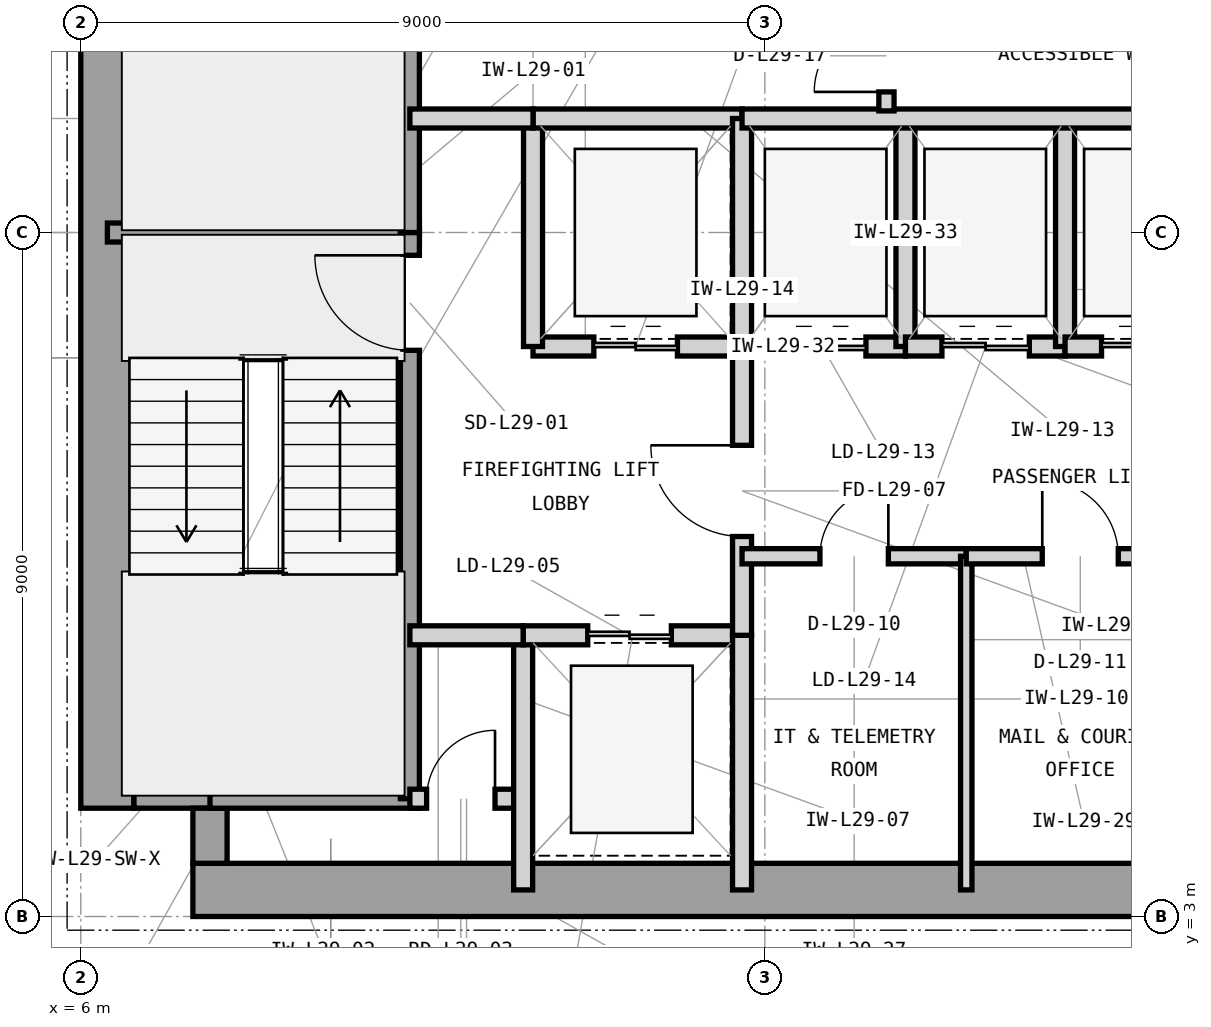
"""IFC4 building model, lengths in metres.
Left out: names, types, materials, properties, quantities, classifications, styles, units other than length and angle.
Written with IfcOpenShell. Run it as: python <this file> out.ifc"""

import sys

from ifc_helpers import new_model, si_unit, direction, frame, frame_2d, origin, place, context, subcontext, project, spatial, rectangle, extrude, element, fill, save


model = new_model("IFC4")
c1 = context("Model", 3, precision=1e-05, world=origin(), true_north=direction((0.0, 1.0)))
c2 = subcontext(c1, "Body", "Model", "MODEL_VIEW")
j1 = project(units=[si_unit("LENGTHUNIT", "METRE"), si_unit("PLANEANGLEUNIT", "RADIAN")], contexts=[c1])
p1 = place(None, origin())
s1 = spatial("IfcSite", under=j1, at=p1, CompositionType="ELEMENT")
p2 = place(p1, origin())
s2 = spatial("IfcBuilding", under=s1, at=p2, CompositionType="ELEMENT")
p3 = place(p2, frame((0.0, 0.0, 124.5)))
s3 = spatial("IfcBuildingStorey", under=s2, at=p3, CompositionType="ELEMENT", Elevation=124.5)
p4 = place(p3, frame((7.475, 3.35, 0.0), z_axis=(0.0, 0.0, 1.0), x_axis=(1.0, 0.0, 0.0)))
e1 = element("IfcWall", 1, at=p4, inside=s3, PredefinedType="SHEAR", context=c2, shape_type="SweptSolid", body=[
    extrude(rectangle(XDim=16.525, YDim=0.7, at=frame_2d((8.262, 0.0))), origin(), (0.0, 0.0, 1.0), 3.9),
])
p5 = place(p3, frame((6.35, 4.425, 0.0), z_axis=(0.0, 0.0, 1.0), x_axis=(0.0, 1.0, 0.0)))
e2 = element("IfcWall", 2, at=p5, inside=s3, PredefinedType="SHEAR", context=c2, shape_type="SweptSolid", body=[
    extrude(rectangle(XDim=15.15, YDim=0.7, at=frame_2d((7.575, 0.0))), origin(), (0.0, 0.0, 1.0), 3.9),
])
p6 = place(p3, frame((6.7, 4.65, 0.0), z_axis=(0.0, 0.0, 1.0), x_axis=(1.0, 0.0, 0.0)))
e3 = element("IfcWall", 3, at=p6, inside=s3, PredefinedType="SHEAR", context=c2, shape_type="SweptSolid", body=[
    extrude(rectangle(XDim=1.225, YDim=0.45, at=frame_2d((0.613, 0.0))), origin(), (0.0, 0.0, 1.0), 3.9),
])
p7 = place(p3, frame((7.7, 3.7, 0.0), z_axis=(0.0, 0.0, 1.0), x_axis=(0.0, 1.0, 0.0)))
e4 = element("IfcWall", 4, at=p7, inside=s3, PredefinedType="SHEAR", context=c2, shape_type="SweptSolid", body=[
    extrude(rectangle(XDim=0.725, YDim=0.45, at=frame_2d((0.363, 0.0))), origin(), (0.0, 0.0, 1.0), 3.9),
])
p8 = place(p3, frame((6.35, 12.0, 0.0), z_axis=(0.0, 0.0, 1.0), x_axis=(1.0, 0.0, 0.0)))
e5 = element("IfcWall", 5, at=p8, inside=s3, PredefinedType="SHEAR", context=c2, shape_type="SweptSolid", body=[
    extrude(rectangle(XDim=4.105, YDim=0.25, at=frame_2d((2.052, 0.0))), origin(), (0.0, 0.0, 1.0), 3.9),
])
p9 = place(p3, frame((7.7, 4.55, 0.0), z_axis=(0.0, 0.0, 1.0), x_axis=(1.0, 0.0, 0.0)))
e6 = element("IfcWall", 6, at=p9, inside=s3, PredefinedType="SHEAR", context=c2, shape_type="SweptSolid", body=[
    extrude(rectangle(XDim=2.755, YDim=0.25, at=frame_2d((1.377, 0.0))), origin(), (0.0, 0.0, 1.0), 3.9),
])
p10 = place(p3, frame((10.33, 4.55, 0.0), z_axis=(0.0, 0.0, 1.0), x_axis=(0.0, 1.0, 0.0)))
e7 = element("IfcWall", 7, at=p10, inside=s3, PredefinedType="SHEAR", context=c2, shape_type="SweptSolid", body=[
    extrude(rectangle(XDim=7.45, YDim=0.25, at=frame_2d((3.725, 0.0))), origin(), (0.0, 0.0, 1.0), 3.9),
])
p11 = place(p10, frame((5.9, 0.0, 0.0)))
e8 = element("IfcOpeningElement", 8, at=p11, cuts=e7, PredefinedType="OPENING", context=c2, shape_type="SweptSolid", body=[
    extrude(rectangle(XDim=1.25, YDim=2.2, at=frame_2d((0.625, 1.1))), frame((0.0, 0.135, 0.0), z_axis=(0.0, -1.0, 0.0), x_axis=(1.0, 0.0, 0.0)), (0.0, 0.0, 1.0), 0.27),
])
p12 = place(p3, frame((10.33, 12.0, 0.0), z_axis=(0.0, 0.0, 1.0), x_axis=(0.0, 1.0, 0.0)))
e9 = element("IfcWall", 9, at=p12, inside=s3, PredefinedType="SHEAR", context=c2, shape_type="SweptSolid", body=[
    extrude(rectangle(XDim=7.45, YDim=0.25, at=frame_2d((3.725, 0.0))), origin(), (0.0, 0.0, 1.0), 3.9),
])
p13 = place(p12, frame((5.85, 0.0, 0.0)))
e10 = element("IfcOpeningElement", 10, at=p13, cuts=e9, PredefinedType="OPENING", context=c2, shape_type="SweptSolid", body=[
    extrude(rectangle(XDim=1.25, YDim=2.2, at=frame_2d((0.625, 1.1))), frame((0.0, 0.135, 0.0), z_axis=(0.0, -1.0, 0.0), x_axis=(1.0, 0.0, 0.0)), (0.0, 0.0, 1.0), 0.27),
])
p14 = place(p3, frame((10.33, 4.55, 0.0), z_axis=(0.0, 0.0, 1.0), x_axis=(1.0, 0.0, 0.0)))
e11 = element("IfcWall", 11, at=p14, inside=s3, PredefinedType="PARTITIONING", context=c2, shape_type="SweptSolid", body=[
    extrude(rectangle(XDim=1.49, YDim=0.25, at=frame_2d((0.745, 0.0))), origin(), (0.0, 0.0, 1.0), 3.69),
])
p15 = place(p14, frame((0.22, 0.0, 0.0)))
e12 = element("IfcOpeningElement", 12, at=p15, cuts=e11, PredefinedType="OPENING", context=c2, shape_type="SweptSolid", body=[
    extrude(rectangle(XDim=0.9, YDim=2.1, at=frame_2d((0.45, 1.05))), frame((0.0, 0.135, 0.0), z_axis=(0.0, -1.0, 0.0), x_axis=(1.0, 0.0, 0.0)), (0.0, 0.0, 1.0), 0.27),
])
p16 = place(p3, frame((11.82, 3.35, 0.0), z_axis=(0.0, 0.0, 1.0), x_axis=(0.0, 1.0, 0.0)))
e13 = element("IfcWall", 13, at=p16, inside=s3, PredefinedType="PARTITIONING", context=c2, shape_type="SweptSolid", body=[
    extrude(rectangle(XDim=3.35, YDim=0.25, at=frame_2d((1.675, 0.0))), origin(), (0.0, 0.0, 1.0), 3.69),
])
p17 = place(p3, frame((11.82, 6.7, 0.0), z_axis=(0.0, 0.0, 1.0), x_axis=(1.0, 0.0, 0.0)))
e14 = element("IfcWall", 14, at=p17, inside=s3, PredefinedType="PARTITIONING", context=c2, shape_type="SweptSolid", body=[
    extrude(rectangle(XDim=2.88, YDim=0.25, at=frame_2d((1.44, 0.0))), origin(), (0.0, 0.0, 1.0), 3.233),
])
p18 = place(p17, frame((0.85, 0.0, 0.0)))
e15 = element("IfcOpeningElement", 15, at=p18, cuts=e14, PredefinedType="OPENING", context=c2, shape_type="SweptSolid", body=[
    extrude(rectangle(XDim=1.1, YDim=2.25, at=frame_2d((0.55, 1.125))), frame((0.0, 0.135, 0.0), z_axis=(0.0, -1.0, 0.0), x_axis=(1.0, 0.0, 0.0)), (0.0, 0.0, 1.0), 0.27),
])
p19 = place(p3, frame((14.7, 3.35, 0.0), z_axis=(0.0, 0.0, 1.0), x_axis=(0.0, 1.0, 0.0)))
e16 = element("IfcWall", 16, at=p19, inside=s3, PredefinedType="PARTITIONING", context=c2, shape_type="SweptSolid", body=[
    extrude(rectangle(XDim=3.35, YDim=0.25, at=frame_2d((1.675, 0.0))), origin(), (0.0, 0.0, 1.0), 3.69),
])
p20 = place(p3, frame((11.95, 10.5, 0.0), z_axis=(0.0, 0.0, 1.0), x_axis=(1.0, 0.0, 0.0)))
e17 = element("IfcWall", 17, at=p20, inside=s3, PredefinedType="PARTITIONING", context=c2, shape_type="SweptSolid", body=[
    extrude(rectangle(XDim=2.75, YDim=0.25, at=frame_2d((1.375, 0.0))), origin(), (0.0, 0.0, 1.0), 3.233),
])
p21 = place(p20, frame((0.8, 0.0, 0.0)))
e18 = element("IfcOpeningElement", 18, at=p21, cuts=e17, PredefinedType="OPENING", context=c2, shape_type="SweptSolid", body=[
    extrude(rectangle(XDim=1.1, YDim=2.25, at=frame_2d((0.55, 1.125))), frame((0.0, 0.135, 0.0), z_axis=(0.0, -1.0, 0.0), x_axis=(1.0, 0.0, 0.0)), (0.0, 0.0, 1.0), 0.27),
])
p22 = place(p3, frame((11.95, 10.5, 0.0), z_axis=(0.0, 0.0, 1.0), x_axis=(0.0, 1.0, 0.0)))
e19 = element("IfcWall", 19, at=p22, inside=s3, PredefinedType="PARTITIONING", context=c2, shape_type="SweptSolid", body=[
    extrude(rectangle(XDim=3.0, YDim=0.25, at=frame_2d((1.5, 0.0))), origin(), (0.0, 0.0, 1.0), 3.69),
])
p23 = place(p3, frame((11.95, 13.5, 0.0), z_axis=(0.0, 0.0, 1.0), x_axis=(1.0, 0.0, 0.0)))
e20 = element("IfcWall", 20, at=p23, inside=s3, PredefinedType="PARTITIONING", context=c2, shape_type="SweptSolid", body=[
    extrude(rectangle(XDim=2.75, YDim=0.25, at=frame_2d((1.375, 0.0))), origin(), (0.0, 0.0, 1.0), 3.233),
])
p24 = place(p3, frame((14.7, 10.5, 0.0), z_axis=(0.0, 0.0, 1.0), x_axis=(0.0, 1.0, 0.0)))
e21 = element("IfcWall", 21, at=p24, inside=s3, PredefinedType="PARTITIONING", context=c2, shape_type="SweptSolid", body=[
    extrude(rectangle(XDim=3.0, YDim=0.25, at=frame_2d((1.5, 0.0))), origin(), (0.0, 0.0, 1.0), 3.69),
])
p25 = place(p3, frame((14.7, 6.7, 0.0), z_axis=(0.0, 0.0, 1.0), x_axis=(0.0, 1.0, 0.0)))
e22 = element("IfcWall", 22, at=p25, inside=s3, PredefinedType="PARTITIONING", context=c2, shape_type="SweptSolid", body=[
    extrude(rectangle(XDim=3.8, YDim=0.25, at=frame_2d((1.9, 0.0))), origin(), (0.0, 0.0, 1.0), 3.69),
])
p26 = place(p25, frame((1.3, 0.0, 0.0)))
e23 = element("IfcOpeningElement", 23, at=p26, cuts=e22, PredefinedType="OPENING", context=c2, shape_type="SweptSolid", body=[
    extrude(rectangle(XDim=1.2, YDim=2.2, at=frame_2d((0.6, 1.1))), frame((0.0, 0.135, 0.0), z_axis=(0.0, -1.0, 0.0), x_axis=(1.0, 0.0, 0.0)), (0.0, 0.0, 1.0), 0.27),
])
p27 = place(p3, frame((10.33, 13.5, 0.0), z_axis=(0.0, 0.0, 1.0), x_axis=(1.0, 0.0, 0.0)))
e24 = element("IfcWall", 24, at=p27, inside=s3, PredefinedType="PARTITIONING", context=c2, shape_type="SweptSolid", body=[
    extrude(rectangle(XDim=1.62, YDim=0.25, at=frame_2d((0.81, 0.0))), origin(), (0.0, 0.0, 1.0), 3.233),
])
p28 = place(p3, frame((10.33, 6.7, 0.0), z_axis=(0.0, 0.0, 1.0), x_axis=(1.0, 0.0, 0.0)))
e25 = element("IfcWall", 25, at=p28, inside=s3, PredefinedType="PARTITIONING", context=c2, shape_type="SweptSolid", body=[
    extrude(rectangle(XDim=1.49, YDim=0.25, at=frame_2d((0.745, 0.0))), origin(), (0.0, 0.0, 1.0), 3.233),
])
p29 = place(p3, frame((14.7, 7.74, 0.0), z_axis=(0.0, 0.0, 1.0), x_axis=(1.0, 0.0, 0.0)))
e26 = element("IfcWall", 26, at=p29, inside=s3, PredefinedType="PARTITIONING", context=c2, shape_type="SweptSolid", body=[
    extrude(rectangle(XDim=2.95, YDim=0.2, at=frame_2d((1.475, 0.0))), origin(), (0.0, 0.0, 1.0), 3.69),
])
p30 = place(p29, frame((1.025, 0.0, 0.0)))
e27 = element("IfcOpeningElement", 27, at=p30, cuts=e26, PredefinedType="OPENING", context=c2, shape_type="SweptSolid", body=[
    extrude(rectangle(XDim=0.9, YDim=2.1, at=frame_2d((0.45, 1.05))), frame((0.0, 0.11, 0.0), z_axis=(0.0, -1.0, 0.0), x_axis=(1.0, 0.0, 0.0)), (0.0, 0.0, 1.0), 0.22),
])
p31 = place(p3, frame((17.65, 3.35, 0.0), z_axis=(0.0, 0.0, 1.0), x_axis=(0.0, 1.0, 0.0)))
e28 = element("IfcWall", 28, at=p31, inside=s3, PredefinedType="PARTITIONING", context=c2, shape_type="SweptSolid", body=[
    extrude(rectangle(XDim=4.39, YDim=0.15, at=frame_2d((2.195, 0.0))), origin(), (0.0, 0.0, 1.0), 3.69),
])
p32 = place(p3, frame((17.65, 7.74, 0.0), z_axis=(0.0, 0.0, 1.0), x_axis=(1.0, 0.0, 0.0)))
e29 = element("IfcWall", 29, at=p32, inside=s3, PredefinedType="PARTITIONING", context=c2, shape_type="SweptSolid", body=[
    extrude(rectangle(XDim=3.0, YDim=0.2, at=frame_2d((1.5, 0.0))), origin(), (0.0, 0.0, 1.0), 3.69),
])
p33 = place(p32, frame((1.0, 0.0, 0.0)))
e30 = element("IfcOpeningElement", 30, at=p33, cuts=e29, PredefinedType="OPENING", context=c2, shape_type="SweptSolid", body=[
    extrude(rectangle(XDim=1.0, YDim=2.15, at=frame_2d((0.5, 1.075))), frame((0.0, 0.11, 0.0), z_axis=(0.0, -1.0, 0.0), x_axis=(1.0, 0.0, 0.0)), (0.0, 0.0, 1.0), 0.22),
])
p34 = place(p3, frame((14.7, 10.5, 0.0), z_axis=(0.0, 0.0, 1.0), x_axis=(1.0, 0.0, 0.0)))
e31 = element("IfcWall", 31, at=p34, inside=s3, PredefinedType="PARTITIONING", context=c2, shape_type="SweptSolid", body=[
    extrude(rectangle(XDim=2.15, YDim=0.25, at=frame_2d((1.075, 0.0))), origin(), (0.0, 0.0, 1.0), 3.233),
])
p35 = place(p34, frame((0.48, 0.0, 0.0)))
e32 = element("IfcOpeningElement", 32, at=p35, cuts=e31, PredefinedType="OPENING", context=c2, shape_type="SweptSolid", body=[
    extrude(rectangle(XDim=1.15, YDim=2.25, at=frame_2d((0.575, 1.125))), frame((0.0, 0.135, 0.0), z_axis=(0.0, -1.0, 0.0), x_axis=(1.0, 0.0, 0.0)), (0.0, 0.0, 1.0), 0.27),
])
p36 = place(p3, frame((16.85, 10.5, 0.0), z_axis=(0.0, 0.0, 1.0), x_axis=(0.0, 1.0, 0.0)))
e33 = element("IfcWall", 33, at=p36, inside=s3, PredefinedType="PARTITIONING", context=c2, shape_type="SweptSolid", body=[
    extrude(rectangle(XDim=3.0, YDim=0.25, at=frame_2d((1.5, 0.0))), origin(), (0.0, 0.0, 1.0), 3.69),
])
p37 = place(p3, frame((16.85, 10.5, 0.0), z_axis=(0.0, 0.0, 1.0), x_axis=(1.0, 0.0, 0.0)))
e34 = element("IfcWall", 34, at=p37, inside=s3, PredefinedType="PARTITIONING", context=c2, shape_type="SweptSolid", body=[
    extrude(rectangle(XDim=2.1, YDim=0.25, at=frame_2d((1.05, 0.0))), origin(), (0.0, 0.0, 1.0), 3.233),
])
p38 = place(p37, frame((0.48, 0.0, 0.0)))
e35 = element("IfcOpeningElement", 35, at=p38, cuts=e34, PredefinedType="OPENING", context=c2, shape_type="SweptSolid", body=[
    extrude(rectangle(XDim=1.15, YDim=2.25, at=frame_2d((0.575, 1.125))), frame((0.0, 0.135, 0.0), z_axis=(0.0, -1.0, 0.0), x_axis=(1.0, 0.0, 0.0)), (0.0, 0.0, 1.0), 0.27),
])
p39 = place(p3, frame((18.95, 10.5, 0.0), z_axis=(0.0, 0.0, 1.0), x_axis=(0.0, 1.0, 0.0)))
e36 = element("IfcWall", 36, at=p39, inside=s3, PredefinedType="PARTITIONING", context=c2, shape_type="SweptSolid", body=[
    extrude(rectangle(XDim=3.0, YDim=0.25, at=frame_2d((1.5, 0.0))), origin(), (0.0, 0.0, 1.0), 3.69),
])
p40 = place(p3, frame((18.95, 10.5, 0.0), z_axis=(0.0, 0.0, 1.0), x_axis=(1.0, 0.0, 0.0)))
e37 = element("IfcWall", 37, at=p40, inside=s3, PredefinedType="PARTITIONING", context=c2, shape_type="SweptSolid", body=[
    extrude(rectangle(XDim=2.1, YDim=0.25, at=frame_2d((1.05, 0.0))), origin(), (0.0, 0.0, 1.0), 3.233),
])
p41 = place(p40, frame((0.48, 0.0, 0.0)))
e38 = element("IfcOpeningElement", 38, at=p41, cuts=e37, PredefinedType="OPENING", context=c2, shape_type="SweptSolid", body=[
    extrude(rectangle(XDim=1.15, YDim=2.25, at=frame_2d((0.575, 1.125))), frame((0.0, 0.135, 0.0), z_axis=(0.0, -1.0, 0.0), x_axis=(1.0, 0.0, 0.0)), (0.0, 0.0, 1.0), 0.27),
])
p42 = place(p3, frame((14.7, 13.5, 0.0), z_axis=(0.0, 0.0, 1.0), x_axis=(1.0, 0.0, 0.0)))
e39 = element("IfcWall", 39, at=p42, inside=s3, PredefinedType="PARTITIONING", context=c2, shape_type="SweptSolid", body=[
    extrude(rectangle(XDim=8.95, YDim=0.25, at=frame_2d((4.475, 0.0))), origin(), (0.0, 0.0, 1.0), 3.233),
])
p43 = place(p3, frame((16.6, 13.6, 0.0), z_axis=(0.0, 0.0, 1.0), x_axis=(0.0, 1.0, 0.0)))
e40 = element("IfcWall", 40, at=p43, inside=s3, PredefinedType="PARTITIONING", context=c2, shape_type="SweptSolid", body=[
    extrude(rectangle(XDim=3.0, YDim=0.2, at=frame_2d((1.5, 0.0))), origin(), (0.0, 0.0, 1.0), 3.69),
])
p44 = place(p43, frame((0.25, 0.0, 0.0)))
e41 = element("IfcOpeningElement", 41, at=p44, cuts=e40, PredefinedType="OPENING", context=c2, shape_type="SweptSolid", body=[
    extrude(rectangle(XDim=0.95, YDim=2.1, at=frame_2d((0.475, 1.05))), frame((0.0, 0.11, 0.0), z_axis=(0.0, -1.0, 0.0), x_axis=(1.0, 0.0, 0.0)), (0.0, 0.0, 1.0), 0.22),
])
p45 = place(p43, frame((1.8, 0.0, 0.0)))
e42 = element("IfcOpeningElement", 42, at=p45, cuts=e40, PredefinedType="OPENING", context=c2, shape_type="SweptSolid", body=[
    extrude(rectangle(XDim=0.95, YDim=2.1, at=frame_2d((0.475, 1.05))), frame((0.0, 0.11, 0.0), z_axis=(0.0, -1.0, 0.0), x_axis=(1.0, 0.0, 0.0)), (0.0, 0.0, 1.0), 0.22),
])
p46 = place(p11, origin())
e43 = element("IfcDoor", 43, at=p46, inside=s3, OperationType="SINGLE_SWING_RIGHT", PredefinedType="DOOR", context=c2, shape_type="SweptSolid", body=[
    extrude(rectangle(XDim=1.25, YDim=2.2, at=frame_2d((0.625, 1.1))), frame((0.0, 0.025, 0.0), z_axis=(0.0, -1.0, 0.0), x_axis=(1.0, 0.0, 0.0)), (0.0, 0.0, 1.0), 0.05),
])
fill(e8, e43)
p47 = place(p15, origin())
e44 = element("IfcDoor", 44, at=p47, inside=s3, OperationType="SINGLE_SWING_RIGHT", PredefinedType="TRAPDOOR", context=c2, shape_type="SweptSolid", body=[
    extrude(rectangle(XDim=0.9, YDim=2.1, at=frame_2d((0.45, 1.05))), frame((0.0, 0.025, 0.0), z_axis=(0.0, -1.0, 0.0), x_axis=(1.0, 0.0, 0.0)), (0.0, 0.0, 1.0), 0.05),
])
fill(e12, e44)
p48 = place(p18, origin())
e45 = element("IfcDoor", 45, at=p48, inside=s3, OperationType="DOUBLE_DOOR_SLIDING", PredefinedType="DOOR", context=c2, shape_type="SweptSolid", body=[
    extrude(rectangle(XDim=1.1, YDim=2.25, at=frame_2d((0.55, 1.125))), frame((0.0, 0.025, 0.0), z_axis=(0.0, -1.0, 0.0), x_axis=(1.0, 0.0, 0.0)), (0.0, 0.0, 1.0), 0.05),
])
fill(e15, e45)
p49 = place(p21, origin())
e46 = element("IfcDoor", 46, at=p49, inside=s3, OperationType="DOUBLE_DOOR_SLIDING", PredefinedType="DOOR", context=c2, shape_type="SweptSolid", body=[
    extrude(rectangle(XDim=1.1, YDim=2.25, at=frame_2d((0.55, 1.125))), frame((0.0, 0.025, 0.0), z_axis=(0.0, -1.0, 0.0), x_axis=(1.0, 0.0, 0.0)), (0.0, 0.0, 1.0), 0.05),
])
fill(e18, e46)
p50 = place(p26, origin())
e47 = element("IfcDoor", 47, at=p50, inside=s3, OperationType="SINGLE_SWING_RIGHT", PredefinedType="DOOR", context=c2, shape_type="SweptSolid", body=[
    extrude(rectangle(XDim=1.2, YDim=2.2, at=frame_2d((0.6, 1.1))), frame((0.0, 0.025, 0.0), z_axis=(0.0, -1.0, 0.0), x_axis=(1.0, 0.0, 0.0)), (0.0, 0.0, 1.0), 0.05),
])
fill(e23, e47)
p51 = place(p30, origin())
e48 = element("IfcDoor", 48, at=p51, inside=s3, OperationType="SINGLE_SWING_RIGHT", PredefinedType="TRAPDOOR", context=c2, shape_type="SweptSolid", body=[
    extrude(rectangle(XDim=0.9, YDim=2.1, at=frame_2d((0.45, 1.05))), frame((0.0, 0.025, 0.0), z_axis=(0.0, -1.0, 0.0), x_axis=(1.0, 0.0, 0.0)), (0.0, 0.0, 1.0), 0.05),
])
fill(e27, e48)
p52 = place(p33, origin())
e49 = element("IfcDoor", 49, at=p52, inside=s3, OperationType="SINGLE_SWING_LEFT", PredefinedType="DOOR", context=c2, shape_type="SweptSolid", body=[
    extrude(rectangle(XDim=1.0, YDim=2.15, at=frame_2d((0.5, 1.075))), frame((0.0, 0.025, 0.0), z_axis=(0.0, -1.0, 0.0), x_axis=(1.0, 0.0, 0.0)), (0.0, 0.0, 1.0), 0.05),
])
fill(e30, e49)
p53 = place(p35, origin())
e50 = element("IfcDoor", 50, at=p53, inside=s3, OperationType="DOUBLE_DOOR_SLIDING", PredefinedType="DOOR", context=c2, shape_type="SweptSolid", body=[
    extrude(rectangle(XDim=1.15, YDim=2.25, at=frame_2d((0.575, 1.125))), frame((0.0, 0.025, 0.0), z_axis=(0.0, -1.0, 0.0), x_axis=(1.0, 0.0, 0.0)), (0.0, 0.0, 1.0), 0.05),
])
fill(e32, e50)
p54 = place(p38, origin())
e51 = element("IfcDoor", 51, at=p54, inside=s3, OperationType="DOUBLE_DOOR_SLIDING", PredefinedType="DOOR", context=c2, shape_type="SweptSolid", body=[
    extrude(rectangle(XDim=1.15, YDim=2.25, at=frame_2d((0.575, 1.125))), frame((0.0, 0.025, 0.0), z_axis=(0.0, -1.0, 0.0), x_axis=(1.0, 0.0, 0.0)), (0.0, 0.0, 1.0), 0.05),
])
fill(e35, e51)
p55 = place(p41, origin())
e52 = element("IfcDoor", 52, at=p55, inside=s3, OperationType="DOUBLE_DOOR_SLIDING", PredefinedType="DOOR", context=c2, shape_type="SweptSolid", body=[
    extrude(rectangle(XDim=1.15, YDim=2.25, at=frame_2d((0.575, 1.125))), frame((0.0, 0.025, 0.0), z_axis=(0.0, -1.0, 0.0), x_axis=(1.0, 0.0, 0.0)), (0.0, 0.0, 1.0), 0.05),
])
fill(e38, e52)
p56 = place(p44, origin())
e53 = element("IfcDoor", 53, at=p56, inside=s3, OperationType="SINGLE_SWING_LEFT", PredefinedType="DOOR", context=c2, shape_type="SweptSolid", body=[
    extrude(rectangle(XDim=0.95, YDim=2.1, at=frame_2d((0.475, 1.05))), frame((0.0, 0.025, 0.0), z_axis=(0.0, -1.0, 0.0), x_axis=(1.0, 0.0, 0.0)), (0.0, 0.0, 1.0), 0.05),
])
fill(e41, e53)
save(model, sys.argv[1])
